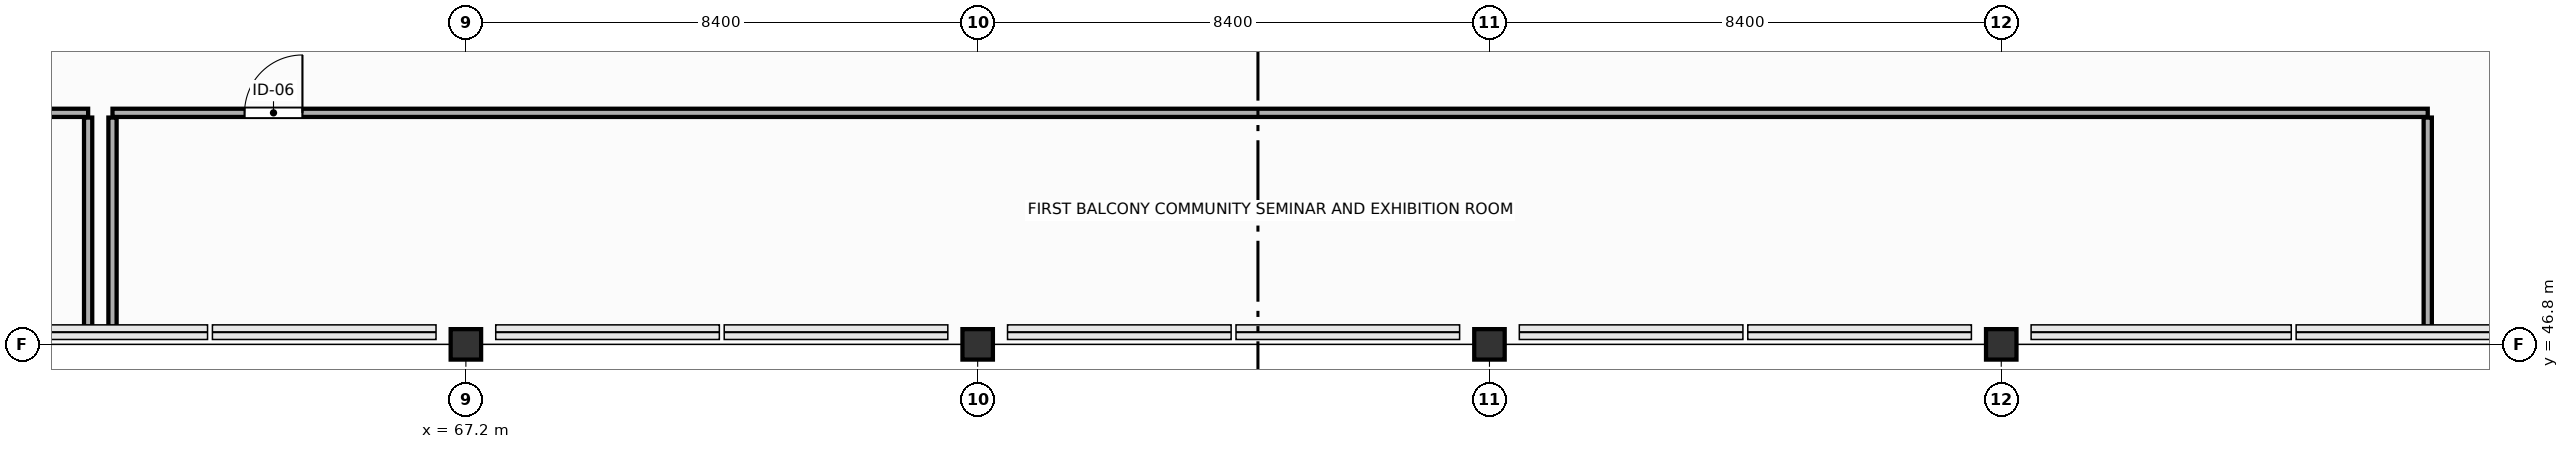
"""IFC4 building model, lengths in metres.
Left out: names, types, materials, properties, quantities, classifications, styles, units other than length and angle.
Written with IfcOpenShell. Run it as: python <this file> out.ifc"""

import sys

from ifc_helpers import new_model, si_unit, direction, frame, frame_2d, origin, origin_2d, place, context, subcontext, project, spatial, rectangle, extrude, element, fill, save


model = new_model("IFC4")
c1 = context("Model", 3, precision=1e-05, world=origin(), true_north=direction((0.0, 1.0)))
c2 = subcontext(c1, "Body", "Model", "MODEL_VIEW")
j1 = project(units=[si_unit("LENGTHUNIT", "METRE"), si_unit("PLANEANGLEUNIT", "RADIAN")], contexts=[c1])
p1 = place(None, origin())
s1 = spatial("IfcSite", under=j1, at=p1, CompositionType="ELEMENT")
p2 = place(p1, origin())
s2 = spatial("IfcBuilding", under=s1, at=p2, CompositionType="ELEMENT")
p3 = place(p2, frame((0.0, 0.0, 5.4)))
s3 = spatial("IfcBuildingStorey", under=s2, at=p3, CompositionType="ELEMENT", Elevation=5.4)
for number, where, z_axis, x_axis in (
    (1, (67.2, 46.8, 0.0), (0.0, 0.0, 1.0), (1.0, 0.0, 0.0)),
    (2, (75.6, 46.8, 0.0), (0.0, 0.0, 1.0), (1.0, 0.0, 0.0)),
    (3, (84.0, 46.8, 0.0), (0.0, 0.0, 1.0), (1.0, 0.0, 0.0)),
    (4, (92.4, 46.8, 0.0), (0.0, 0.0, 1.0), (1.0, 0.0, 0.0)),
):
    element("IfcColumn", number, at=place(p3, frame(where, z_axis=z_axis, x_axis=x_axis)), inside=s3, PredefinedType="COLUMN", context=c2, shape_type="SweptSolid", body=[
        extrude(rectangle(XDim=0.5, YDim=0.5, at=origin_2d()), origin(), (0.0, 0.0, 1.0), 4.5),
    ])
p4 = place(p3, frame((46.8, 50.6, 0.0), z_axis=(0.0, 0.0, 1.0), x_axis=(1.0, 0.0, 0.0)))
e5 = element("IfcWall", 5, at=p4, inside=s3, PredefinedType="PARTITIONING", context=c2, shape_type="SweptSolid", body=[
    extrude(rectangle(XDim=14.2, YDim=0.135, at=frame_2d((7.1, 0.0))), origin(), (0.0, 0.0, 1.0), 3.23),
])
p5 = place(p4, frame((2.232, 0.0, 0.0)))
e6 = element("IfcOpeningElement", 6, at=p5, cuts=e5, PredefinedType="OPENING", context=c2, shape_type="SweptSolid", body=[
    extrude(rectangle(XDim=0.95, YDim=2.15, at=frame_2d((0.475, 1.075))), frame((0.0, 0.077, 0.0), z_axis=(0.0, -1.0, 0.0), x_axis=(1.0, 0.0, 0.0)), (0.0, 0.0, 1.0), 0.155),
])
p6 = place(p3, frame((61.0, 50.522, 0.0), z_axis=(0.0, 0.0, 1.0), x_axis=(0.0, -1.0, 0.0)))
e7 = element("IfcWall", 7, at=p6, inside=s3, PredefinedType="PARTITIONING", context=c2, shape_type="SweptSolid", body=[
    extrude(rectangle(XDim=3.432, YDim=0.135, at=frame_2d((1.716, 0.0))), origin(), (0.0, 0.0, 1.0), 3.53),
])
p7 = place(p3, frame((61.4, 50.6, 0.0), z_axis=(0.0, 0.0, 1.0), x_axis=(1.0, 0.0, 0.0)))
e8 = element("IfcWall", 8, at=p7, inside=s3, PredefinedType="PARTITIONING", context=c2, shape_type="SweptSolid", body=[
    extrude(rectangle(XDim=38.0, YDim=0.135, at=frame_2d((19.0, 0.0))), origin(), (0.0, 0.0, 1.0), 4.225),
])
p8 = place(p7, frame((2.167, 0.0, 0.0)))
e9 = element("IfcOpeningElement", 9, at=p8, cuts=e8, PredefinedType="OPENING", context=c2, shape_type="SweptSolid", body=[
    extrude(rectangle(XDim=0.95, YDim=2.15, at=frame_2d((0.475, 1.075))), frame((0.0, 0.077, 0.0), z_axis=(0.0, -1.0, 0.0), x_axis=(1.0, 0.0, 0.0)), (0.0, 0.0, 1.0), 0.155),
])
p9 = place(p3, frame((61.4, 47.09, 0.0), z_axis=(0.0, 0.0, 1.0), x_axis=(0.0, 1.0, 0.0)))
e10 = element("IfcWall", 10, at=p9, inside=s3, PredefinedType="PARTITIONING", context=c2, shape_type="SweptSolid", body=[
    extrude(rectangle(XDim=3.432, YDim=0.135, at=frame_2d((1.716, 0.0))), origin(), (0.0, 0.0, 1.0), 3.53),
])
p10 = place(p3, frame((99.4, 50.522, 0.0), z_axis=(0.0, 0.0, 1.0), x_axis=(0.0, -1.0, 0.0)))
e11 = element("IfcWall", 11, at=p10, inside=s3, PredefinedType="PARTITIONING", context=c2, shape_type="SweptSolid", body=[
    extrude(rectangle(XDim=3.432, YDim=0.135, at=frame_2d((1.716, 0.0))), origin(), (0.0, 0.0, 1.0), 3.43),
])
p11 = place(p8, origin())
e12 = element("IfcDoor", 12, at=p11, inside=s3, OperationType="SINGLE_SWING_RIGHT", PredefinedType="DOOR", context=c2, shape_type="SweptSolid", body=[
    extrude(rectangle(XDim=0.95, YDim=2.15, at=frame_2d((0.475, 1.075))), frame((0.0, 0.025, 0.0), z_axis=(0.0, -1.0, 0.0), x_axis=(1.0, 0.0, 0.0)), (0.0, 0.0, 1.0), 0.05),
])
fill(e9, e12)
save(model, sys.argv[1])
